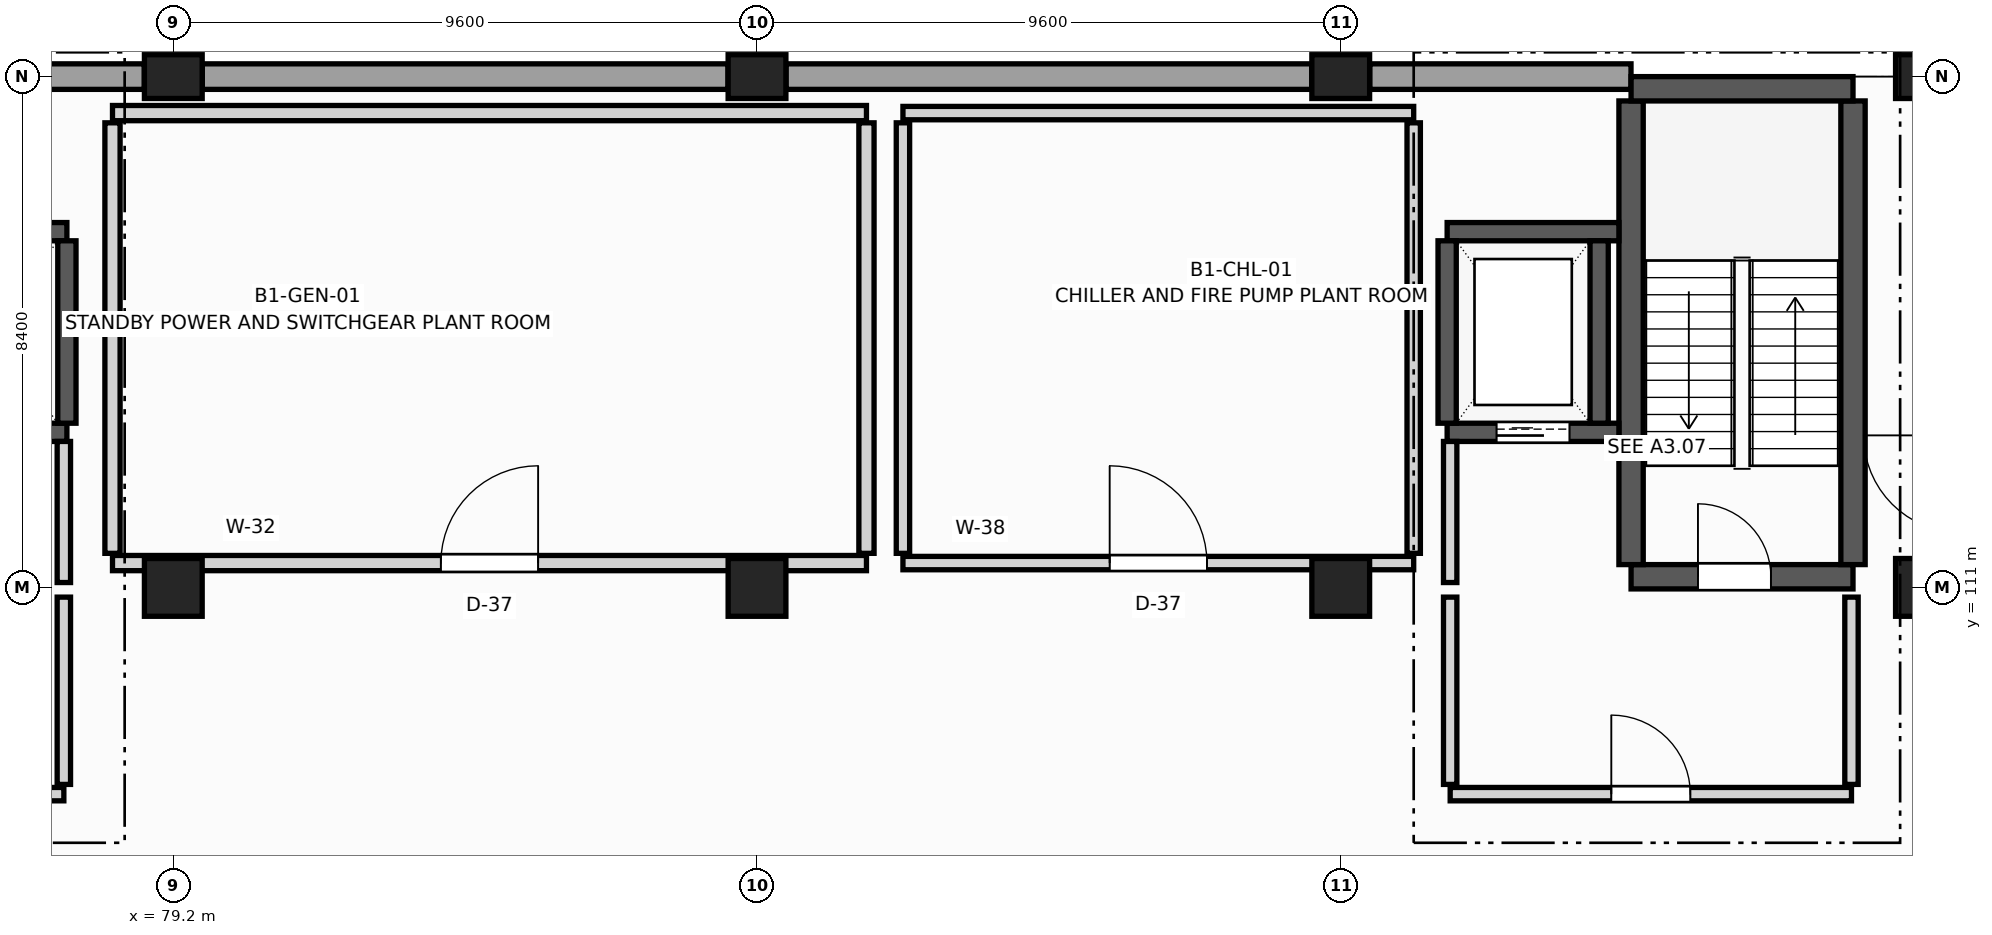
"""IFC4 building model, lengths in metres.
Left out: names, types, materials, properties, quantities, classifications, styles, units other than length and angle.
Written with IfcOpenShell. Run it as: python <this file> out.ifc"""

import sys

from ifc_helpers import new_model, si_unit, direction, frame, frame_2d, origin, origin_2d, place, context, subcontext, project, spatial, rectangle, extrude, element, fill, save


model = new_model("IFC4")
c1 = context("Model", 3, precision=1e-05, world=origin(), true_north=direction((0.0, 1.0)))
c2 = subcontext(c1, "Body", "Model", "MODEL_VIEW")
j1 = project(units=[si_unit("LENGTHUNIT", "METRE"), si_unit("PLANEANGLEUNIT", "RADIAN")], contexts=[c1])
p1 = place(None, origin())
s1 = spatial("IfcSite", under=j1, at=p1, CompositionType="ELEMENT")
p2 = place(p1, origin())
s2 = spatial("IfcBuilding", under=s1, at=p2, CompositionType="ELEMENT")
p3 = place(p2, frame((0.0, 0.0, -4.5)))
s3 = spatial("IfcBuildingStorey", under=s2, at=p3, CompositionType="ELEMENT", Elevation=-4.5)
p4 = place(p3, frame((79.2, 111.0, 0.0), z_axis=(0.0, 0.0, 1.0), x_axis=(1.0, 0.0, 0.0)))
e1 = element("IfcColumn", 1, at=p4, inside=s3, PredefinedType="COLUMN", context=c2, shape_type="SweptSolid", body=[
    extrude(rectangle(XDim=0.95, YDim=0.95, at=origin_2d()), origin(), (0.0, 0.0, 1.0), 4.14),
])
p5 = place(p3, frame((79.2, 119.4, 0.0), z_axis=(0.0, 0.0, 1.0), x_axis=(1.0, 0.0, 0.0)))
e2 = element("IfcColumn", 2, at=p5, inside=s3, PredefinedType="COLUMN", context=c2, shape_type="SweptSolid", body=[
    extrude(rectangle(XDim=0.95, YDim=0.72, at=origin_2d()), origin(), (0.0, 0.0, 1.0), 4.14),
])
p6 = place(p3, frame((88.8, 111.0, 0.0), z_axis=(0.0, 0.0, 1.0), x_axis=(1.0, 0.0, 0.0)))
e3 = element("IfcColumn", 3, at=p6, inside=s3, PredefinedType="COLUMN", context=c2, shape_type="SweptSolid", body=[
    extrude(rectangle(XDim=0.95, YDim=0.95, at=origin_2d()), origin(), (0.0, 0.0, 1.0), 4.14),
])
p7 = place(p3, frame((88.8, 119.4, 0.0), z_axis=(0.0, 0.0, 1.0), x_axis=(1.0, 0.0, 0.0)))
e4 = element("IfcColumn", 4, at=p7, inside=s3, PredefinedType="COLUMN", context=c2, shape_type="SweptSolid", body=[
    extrude(rectangle(XDim=0.95, YDim=0.72, at=origin_2d()), origin(), (0.0, 0.0, 1.0), 4.14),
])
p8 = place(p3, frame((98.4, 111.0, 0.0), z_axis=(0.0, 0.0, 1.0), x_axis=(1.0, 0.0, 0.0)))
e5 = element("IfcColumn", 5, at=p8, inside=s3, PredefinedType="COLUMN", context=c2, shape_type="SweptSolid", body=[
    extrude(rectangle(XDim=0.95, YDim=0.95, at=origin_2d()), origin(), (0.0, 0.0, 1.0), 4.14),
])
p9 = place(p3, frame((98.4, 119.4, 0.0), z_axis=(0.0, 0.0, 1.0), x_axis=(1.0, 0.0, 0.0)))
e6 = element("IfcColumn", 6, at=p9, inside=s3, PredefinedType="COLUMN", context=c2, shape_type="SweptSolid", body=[
    extrude(rectangle(XDim=0.95, YDim=0.72, at=origin_2d()), origin(), (0.0, 0.0, 1.0), 4.14),
])
p10 = place(p3, frame((108.0, 111.0, 0.0), z_axis=(0.0, 0.0, 1.0), x_axis=(1.0, 0.0, 0.0)))
e7 = element("IfcColumn", 7, at=p10, inside=s3, PredefinedType="COLUMN", context=c2, shape_type="SweptSolid", body=[
    extrude(rectangle(XDim=0.95, YDim=0.95, at=origin_2d()), origin(), (0.0, 0.0, 1.0), 4.14),
])
p11 = place(p3, frame((108.0, 119.4, 0.0), z_axis=(0.0, 0.0, 1.0), x_axis=(1.0, 0.0, 0.0)))
e8 = element("IfcColumn", 8, at=p11, inside=s3, PredefinedType="COLUMN", context=c2, shape_type="SweptSolid", body=[
    extrude(rectangle(XDim=0.95, YDim=0.72, at=origin_2d()), origin(), (0.0, 0.0, 1.0), 4.14),
])
p12 = place(p3, frame((74.476, 119.4, 0.0), z_axis=(0.0, 0.0, 1.0), x_axis=(1.0, 0.0, 0.0)))
e9 = element("IfcWall", 9, at=p12, inside=s3, PredefinedType="SOLIDWALL", context=c2, shape_type="SweptSolid", body=[
    extrude(rectangle(XDim=4.247, YDim=0.42, at=frame_2d((2.124, 0.0))), origin(), (0.0, 0.0, 1.0), 4.135),
])
for number, where, z_axis, x_axis in (
    (10, (79.677, 119.4, 0.0), (0.0, 0.0, 1.0), (1.0, 0.0, 0.0)),
    (11, (89.277, 119.4, 0.0), (0.0, 0.0, 1.0), (1.0, 0.0, 0.0)),
):
    element("IfcWall", number, at=place(p3, frame(where, z_axis=z_axis, x_axis=x_axis)), inside=s3, PredefinedType="SOLIDWALL", context=c2, shape_type="SweptSolid", body=[
        extrude(rectangle(XDim=8.646, YDim=0.42, at=frame_2d((4.323, 0.0))), origin(), (0.0, 0.0, 1.0), 4.135),
    ])
p13 = place(p3, frame((98.877, 119.4, 0.0), z_axis=(0.0, 0.0, 1.0), x_axis=(1.0, 0.0, 0.0)))
e12 = element("IfcWall", 12, at=p13, inside=s3, PredefinedType="SOLIDWALL", context=c2, shape_type="SweptSolid", body=[
    extrude(rectangle(XDim=4.297, YDim=0.42, at=frame_2d((2.148, 0.0))), origin(), (0.0, 0.0, 1.0), 4.135),
])
p14 = place(p3, frame((103.175, 111.175, 0.0), z_axis=(0.0, 0.0, 1.0), x_axis=(1.0, 0.0, 0.0)))
e13 = element("IfcWall", 13, at=p14, inside=s3, PredefinedType="SHEAR", context=c2, shape_type="SweptSolid", body=[
    extrude(rectangle(XDim=3.65, YDim=0.4, at=frame_2d((1.825, 0.0))), origin(), (0.0, 0.0, 1.0), 4.14),
])
p15 = place(p14, frame((1.1, 0.0, 0.0)))
e14 = element("IfcOpeningElement", 14, at=p15, cuts=e13, PredefinedType="OPENING", context=c2, shape_type="SweptSolid", body=[
    extrude(rectangle(XDim=1.2, YDim=2.2, at=frame_2d((0.6, 1.1))), frame((0.0, 0.21, 0.0), z_axis=(0.0, -1.0, 0.0), x_axis=(1.0, 0.0, 0.0)), (0.0, 0.0, 1.0), 0.42),
])
for number, where, z_axis, x_axis in (
    (15, (103.175, 111.375, 0.0), (0.0, 0.0, 1.0), (0.0, 1.0, 0.0)),
    (16, (106.825, 111.375, 0.0), (0.0, 0.0, 1.0), (0.0, 1.0, 0.0)),
):
    element("IfcWall", number, at=place(p3, frame(where, z_axis=z_axis, x_axis=x_axis)), inside=s3, PredefinedType="SHEAR", context=c2, shape_type="SweptSolid", body=[
        extrude(rectangle(XDim=7.625, YDim=0.4, at=frame_2d((3.812, 0.0))), origin(), (0.0, 0.0, 1.0), 4.14),
    ])
p16 = place(p3, frame((103.175, 119.2, 0.0), z_axis=(0.0, 0.0, 1.0), x_axis=(1.0, 0.0, 0.0)))
e17 = element("IfcWall", 17, at=p16, inside=s3, PredefinedType="SHEAR", context=c2, shape_type="SweptSolid", body=[
    extrude(rectangle(XDim=3.65, YDim=0.4, at=frame_2d((1.825, 0.0))), origin(), (0.0, 0.0, 1.0), 4.14),
])
p17 = place(p3, frame((74.7, 113.55, 0.0), z_axis=(0.0, 0.0, 1.0), x_axis=(1.0, 0.0, 0.0)))
e18 = element("IfcWall", 18, at=p17, inside=s3, PredefinedType="SHEAR", context=c2, shape_type="SweptSolid", body=[
    extrude(rectangle(XDim=2.75, YDim=0.3, at=frame_2d((1.375, 0.0))), origin(), (0.0, 0.0, 1.0), 4.14),
])
p18 = place(p17, frame((0.775, 0.0, 0.0)))
e19 = element("IfcOpeningElement", 19, at=p18, cuts=e18, PredefinedType="OPENING", context=c2, shape_type="SweptSolid", body=[
    extrude(rectangle(XDim=1.2, YDim=2.2, at=frame_2d((0.6, 1.1))), frame((0.0, 0.16, 0.0), z_axis=(0.0, -1.0, 0.0), x_axis=(1.0, 0.0, 0.0)), (0.0, 0.0, 1.0), 0.32),
])
p19 = place(p3, frame((74.7, 116.85, 0.0), z_axis=(0.0, 0.0, 1.0), x_axis=(1.0, 0.0, 0.0)))
e20 = element("IfcWall", 20, at=p19, inside=s3, PredefinedType="SHEAR", context=c2, shape_type="SweptSolid", body=[
    extrude(rectangle(XDim=2.75, YDim=0.3, at=frame_2d((1.375, 0.0))), origin(), (0.0, 0.0, 1.0), 4.14),
])
p20 = place(p3, frame((77.45, 113.7, 0.0), z_axis=(0.0, 0.0, 1.0), x_axis=(0.0, 1.0, 0.0)))
e21 = element("IfcWall", 21, at=p20, inside=s3, PredefinedType="SHEAR", context=c2, shape_type="SweptSolid", body=[
    extrude(rectangle(XDim=3.0, YDim=0.3, at=frame_2d((1.5, 0.0))), origin(), (0.0, 0.0, 1.0), 4.14),
])
p21 = place(p3, frame((100.15, 113.55, 0.0), z_axis=(0.0, 0.0, 1.0), x_axis=(1.0, 0.0, 0.0)))
e22 = element("IfcWall", 22, at=p21, inside=s3, PredefinedType="SHEAR", context=c2, shape_type="SweptSolid", body=[
    extrude(rectangle(XDim=2.825, YDim=0.3, at=frame_2d((1.413, 0.0))), origin(), (0.0, 0.0, 1.0), 4.14),
])
p22 = place(p21, frame((0.812, 0.0, 0.0)))
e23 = element("IfcOpeningElement", 23, at=p22, cuts=e22, PredefinedType="OPENING", context=c2, shape_type="SweptSolid", body=[
    extrude(rectangle(XDim=1.2, YDim=2.2, at=frame_2d((0.6, 1.1))), frame((0.0, 0.16, 0.0), z_axis=(0.0, -1.0, 0.0), x_axis=(1.0, 0.0, 0.0)), (0.0, 0.0, 1.0), 0.32),
])
p23 = place(p3, frame((100.15, 116.85, 0.0), z_axis=(0.0, 0.0, 1.0), x_axis=(1.0, 0.0, 0.0)))
e24 = element("IfcWall", 24, at=p23, inside=s3, PredefinedType="SHEAR", context=c2, shape_type="SweptSolid", body=[
    extrude(rectangle(XDim=2.825, YDim=0.3, at=frame_2d((1.413, 0.0))), origin(), (0.0, 0.0, 1.0), 4.14),
])
for number, where, z_axis, x_axis in (
    (25, (100.15, 113.7, 0.0), (0.0, 0.0, 1.0), (0.0, 1.0, 0.0)),
    (26, (102.65, 113.7, 0.0), (0.0, 0.0, 1.0), (0.0, 1.0, 0.0)),
):
    element("IfcWall", number, at=place(p3, frame(where, z_axis=z_axis, x_axis=x_axis)), inside=s3, PredefinedType="SHEAR", context=c2, shape_type="SweptSolid", body=[
        extrude(rectangle(XDim=3.0, YDim=0.3, at=frame_2d((1.5, 0.0))), origin(), (0.0, 0.0, 1.0), 4.14),
    ])
p24 = place(p3, frame((70.8, 107.6, 0.0), z_axis=(0.0, 0.0, 1.0), x_axis=(1.0, 0.0, 0.0)))
e27 = element("IfcWall", 27, at=p24, inside=s3, PredefinedType="PARTITIONING", context=c2, shape_type="SweptSolid", body=[
    extrude(rectangle(XDim=6.6, YDim=0.22, at=frame_2d((3.3, 0.0))), origin(), (0.0, 0.0, 1.0), 3.22),
])
p25 = place(p24, frame((2.65, 0.0, 0.0)))
e28 = element("IfcOpeningElement", 28, at=p25, cuts=e27, PredefinedType="OPENING", context=c2, shape_type="SweptSolid", body=[
    extrude(rectangle(XDim=1.3, YDim=2.2, at=frame_2d((0.65, 1.1))), frame((0.0, 0.12, 0.0), z_axis=(0.0, -1.0, 0.0), x_axis=(1.0, 0.0, 0.0)), (0.0, 0.0, 1.0), 0.24),
])
p26 = place(p3, frame((77.4, 111.08, 0.0), z_axis=(0.0, 0.0, 1.0), x_axis=(0.0, 1.0, 0.0)))
e29 = element("IfcWall", 29, at=p26, inside=s3, PredefinedType="PARTITIONING", context=c2, shape_type="SweptSolid", body=[
    extrude(rectangle(XDim=2.32, YDim=0.22, at=frame_2d((1.16, 0.0))), origin(), (0.0, 0.0, 1.0), 3.22),
])
p27 = place(p3, frame((77.4, 107.76, 0.0), z_axis=(0.0, 0.0, 1.0), x_axis=(0.0, 1.0, 0.0)))
e30 = element("IfcWall", 30, at=p27, inside=s3, PredefinedType="PARTITIONING", context=c2, shape_type="SweptSolid", body=[
    extrude(rectangle(XDim=3.08, YDim=0.22, at=frame_2d((1.54, 0.0))), origin(), (0.0, 0.0, 1.0), 3.22),
])
p28 = place(p3, frame((100.2, 107.6, 0.0), z_axis=(0.0, 0.0, 1.0), x_axis=(1.0, 0.0, 0.0)))
e31 = element("IfcWall", 31, at=p28, inside=s3, PredefinedType="PARTITIONING", context=c2, shape_type="SweptSolid", body=[
    extrude(rectangle(XDim=6.6, YDim=0.22, at=frame_2d((3.3, 0.0))), origin(), (0.0, 0.0, 1.0), 3.22),
])
p29 = place(p28, frame((2.65, 0.0, 0.0)))
e32 = element("IfcOpeningElement", 32, at=p29, cuts=e31, PredefinedType="OPENING", context=c2, shape_type="SweptSolid", body=[
    extrude(rectangle(XDim=1.3, YDim=2.2, at=frame_2d((0.65, 1.1))), frame((0.0, 0.12, 0.0), z_axis=(0.0, -1.0, 0.0), x_axis=(1.0, 0.0, 0.0)), (0.0, 0.0, 1.0), 0.24),
])
p30 = place(p3, frame((100.2, 111.08, 0.0), z_axis=(0.0, 0.0, 1.0), x_axis=(0.0, 1.0, 0.0)))
e33 = element("IfcWall", 33, at=p30, inside=s3, PredefinedType="PARTITIONING", context=c2, shape_type="SweptSolid", body=[
    extrude(rectangle(XDim=2.32, YDim=0.22, at=frame_2d((1.16, 0.0))), origin(), (0.0, 0.0, 1.0), 3.22),
])
for number, where, z_axis, x_axis in (
    (34, (100.2, 107.76, 0.0), (0.0, 0.0, 1.0), (0.0, 1.0, 0.0)),
    (35, (106.8, 107.76, 0.0), (0.0, 0.0, 1.0), (0.0, 1.0, 0.0)),
):
    element("IfcWall", number, at=place(p3, frame(where, z_axis=z_axis, x_axis=x_axis)), inside=s3, PredefinedType="PARTITIONING", context=c2, shape_type="SweptSolid", body=[
        extrude(rectangle(XDim=3.08, YDim=0.22, at=frame_2d((1.54, 0.0))), origin(), (0.0, 0.0, 1.0), 3.22),
    ])
p31 = place(p3, frame((78.2, 111.4, 0.0), z_axis=(0.0, 0.0, 1.0), x_axis=(1.0, 0.0, 0.0)))
e36 = element("IfcWall", 36, at=p31, inside=s3, PredefinedType="PARTITIONING", context=c2, shape_type="SweptSolid", body=[
    extrude(rectangle(XDim=12.4, YDim=0.25, at=frame_2d((6.2, 0.0))), origin(), (0.0, 0.0, 1.0), 3.22),
])
p32 = place(p31, frame((5.4, 0.0, 0.0)))
e37 = element("IfcOpeningElement", 37, at=p32, cuts=e36, PredefinedType="OPENING", context=c2, shape_type="SweptSolid", body=[
    extrude(rectangle(XDim=1.6, YDim=2.3, at=frame_2d((0.8, 1.15))), frame((0.0, 0.135, 0.0), z_axis=(0.0, -1.0, 0.0), x_axis=(1.0, 0.0, 0.0)), (0.0, 0.0, 1.0), 0.27),
])
p33 = place(p3, frame((78.2, 118.8, 0.0), z_axis=(0.0, 0.0, 1.0), x_axis=(1.0, 0.0, 0.0)))
e38 = element("IfcWall", 38, at=p33, inside=s3, PredefinedType="PARTITIONING", context=c2, shape_type="SweptSolid", body=[
    extrude(rectangle(XDim=12.4, YDim=0.25, at=frame_2d((6.2, 0.0))), origin(), (0.0, 0.0, 1.0), 3.22),
])
for number, where, z_axis, x_axis in (
    (39, (78.2, 111.56, 0.0), (0.0, 0.0, 1.0), (0.0, 1.0, 0.0)),
    (40, (90.6, 111.56, 0.0), (0.0, 0.0, 1.0), (0.0, 1.0, 0.0)),
):
    element("IfcWall", number, at=place(p3, frame(where, z_axis=z_axis, x_axis=x_axis)), inside=s3, PredefinedType="PARTITIONING", context=c2, shape_type="SweptSolid", body=[
        extrude(rectangle(XDim=7.08, YDim=0.25, at=frame_2d((3.54, 0.0))), origin(), (0.0, 0.0, 1.0), 3.22),
    ])
p34 = place(p3, frame((91.2, 111.4, 0.0), z_axis=(0.0, 0.0, 1.0), x_axis=(1.0, 0.0, 0.0)))
e41 = element("IfcWall", 41, at=p34, inside=s3, PredefinedType="PARTITIONING", context=c2, shape_type="SweptSolid", body=[
    extrude(rectangle(XDim=8.4, YDim=0.22, at=frame_2d((4.2, 0.0))), origin(), (0.0, 0.0, 1.0), 3.22),
])
p35 = place(p34, frame((3.4, 0.0, 0.0)))
e42 = element("IfcOpeningElement", 42, at=p35, cuts=e41, PredefinedType="OPENING", context=c2, shape_type="SweptSolid", body=[
    extrude(rectangle(XDim=1.6, YDim=2.3, at=frame_2d((0.8, 1.15))), frame((0.0, 0.12, 0.0), z_axis=(0.0, -1.0, 0.0), x_axis=(1.0, 0.0, 0.0)), (0.0, 0.0, 1.0), 0.24),
])
p36 = place(p3, frame((91.2, 118.8, 0.0), z_axis=(0.0, 0.0, 1.0), x_axis=(1.0, 0.0, 0.0)))
e43 = element("IfcWall", 43, at=p36, inside=s3, PredefinedType="PARTITIONING", context=c2, shape_type="SweptSolid", body=[
    extrude(rectangle(XDim=8.4, YDim=0.22, at=frame_2d((4.2, 0.0))), origin(), (0.0, 0.0, 1.0), 3.22),
])
for number, where, z_axis, x_axis in (
    (44, (91.2, 111.56, 0.0), (0.0, 0.0, 1.0), (0.0, 1.0, 0.0)),
    (45, (99.6, 111.56, 0.0), (0.0, 0.0, 1.0), (0.0, 1.0, 0.0)),
):
    element("IfcWall", number, at=place(p3, frame(where, z_axis=z_axis, x_axis=x_axis)), inside=s3, PredefinedType="PARTITIONING", context=c2, shape_type="SweptSolid", body=[
        extrude(rectangle(XDim=7.08, YDim=0.22, at=frame_2d((3.54, 0.0))), origin(), (0.0, 0.0, 1.0), 3.22),
    ])
p37 = place(p15, origin())
e46 = element("IfcDoor", 46, at=p37, inside=s3, OperationType="SINGLE_SWING_LEFT", PredefinedType="DOOR", context=c2, shape_type="SweptSolid", body=[
    extrude(rectangle(XDim=1.2, YDim=2.2, at=frame_2d((0.6, 1.1))), frame((0.0, 0.025, 0.0), z_axis=(0.0, -1.0, 0.0), x_axis=(1.0, 0.0, 0.0)), (0.0, 0.0, 1.0), 0.05),
])
fill(e14, e46)
p38 = place(p22, origin())
e47 = element("IfcDoor", 47, at=p38, inside=s3, OperationType="SLIDING_TO_LEFT", PredefinedType="DOOR", context=c2, shape_type="SweptSolid", body=[
    extrude(rectangle(XDim=1.2, YDim=2.2, at=frame_2d((0.6, 1.1))), frame((0.0, 0.025, 0.0), z_axis=(0.0, -1.0, 0.0), x_axis=(1.0, 0.0, 0.0)), (0.0, 0.0, 1.0), 0.05),
])
fill(e23, e47)
p39 = place(p29, origin())
e48 = element("IfcDoor", 48, at=p39, inside=s3, OperationType="SINGLE_SWING_LEFT", PredefinedType="DOOR", context=c2, shape_type="SweptSolid", body=[
    extrude(rectangle(XDim=1.3, YDim=2.2, at=frame_2d((0.65, 1.1))), frame((0.0, 0.025, 0.0), z_axis=(0.0, -1.0, 0.0), x_axis=(1.0, 0.0, 0.0)), (0.0, 0.0, 1.0), 0.05),
])
fill(e32, e48)
p40 = place(p32, origin())
e49 = element("IfcDoor", 49, at=p40, inside=s3, OperationType="SINGLE_SWING_RIGHT", PredefinedType="DOOR", context=c2, shape_type="SweptSolid", body=[
    extrude(rectangle(XDim=1.6, YDim=2.3, at=frame_2d((0.8, 1.15))), frame((0.0, 0.025, 0.0), z_axis=(0.0, -1.0, 0.0), x_axis=(1.0, 0.0, 0.0)), (0.0, 0.0, 1.0), 0.05),
])
fill(e37, e49)
p41 = place(p35, origin())
e50 = element("IfcDoor", 50, at=p41, inside=s3, OperationType="SINGLE_SWING_LEFT", PredefinedType="DOOR", context=c2, shape_type="SweptSolid", body=[
    extrude(rectangle(XDim=1.6, YDim=2.3, at=frame_2d((0.8, 1.15))), frame((0.0, 0.025, 0.0), z_axis=(0.0, -1.0, 0.0), x_axis=(1.0, 0.0, 0.0)), (0.0, 0.0, 1.0), 0.05),
])
fill(e42, e50)
save(model, sys.argv[1])
